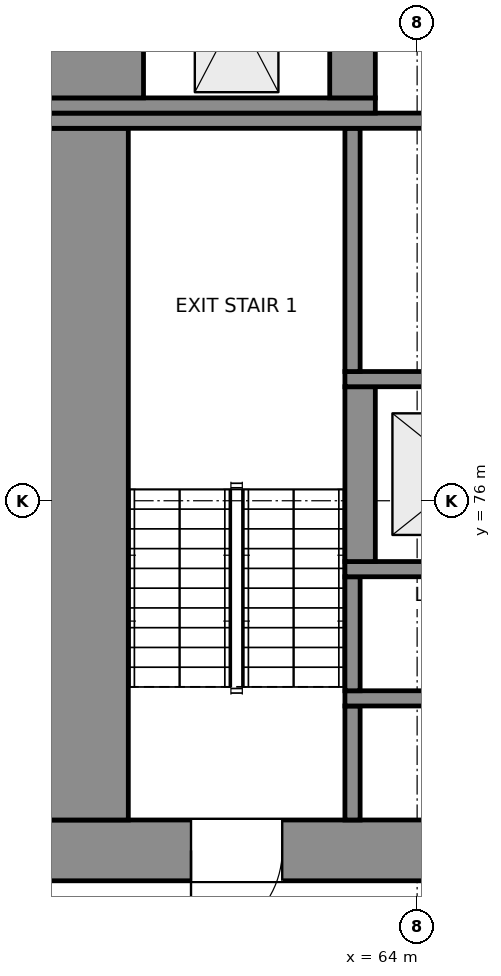
"""IFC4 building model, lengths in metres.
Left out: names, types, materials, properties, quantities, classifications, styles, units other than length and angle.
Written with IfcOpenShell. Run it as: python <this file> out.ifc"""

import sys

from ifc_helpers import new_model, si_unit, direction, frame, frame_2d, origin, place, context, subcontext, project, spatial, rectangle, extrude, element, fill, save


model = new_model("IFC4")
c1 = context("Model", 3, precision=1e-05, world=origin(), true_north=direction((0.0, 1.0)))
c2 = subcontext(c1, "Body", "Model", "MODEL_VIEW")
j1 = project(units=[si_unit("LENGTHUNIT", "METRE"), si_unit("PLANEANGLEUNIT", "RADIAN")], contexts=[c1])
p1 = place(None, origin())
s1 = spatial("IfcSite", under=j1, at=p1, CompositionType="ELEMENT")
p2 = place(p1, origin())
s2 = spatial("IfcBuilding", under=s1, at=p2, CompositionType="ELEMENT")
p3 = place(p2, frame((0.0, 0.0, 204.3)))
s3 = spatial("IfcBuildingStorey", under=s2, at=p3, CompositionType="ELEMENT", Elevation=204.3)
p4 = place(p3, frame((59.0, 71.4, 0.0), z_axis=(0.0, 0.0, 1.0), x_axis=(1.0, 0.0, 0.0)))
e1 = element("IfcWall", 1, at=p4, inside=s3, PredefinedType="SHEAR", context=c2, shape_type="SweptSolid", body=[
    extrude(rectangle(XDim=22.0, YDim=0.8, at=frame_2d((11.0, 0.0))), origin(), (0.0, 0.0, 1.0), 3.9),
])
p5 = place(p4, frame((2.025, 0.0, 0.0)))
e2 = element("IfcOpeningElement", 2, at=p5, cuts=e1, PredefinedType="OPENING", context=c2, shape_type="SweptSolid", body=[
    extrude(rectangle(XDim=1.2, YDim=2.1, at=frame_2d((0.6, 1.05))), frame((0.0, 0.41, 0.0), z_axis=(0.0, -1.0, 0.0), x_axis=(1.0, 0.0, 0.0)), (0.0, 0.0, 1.0), 0.82),
])
p6 = place(p4, frame((18.775, 0.0, 0.0)))
e3 = element("IfcOpeningElement", 3, at=p6, cuts=e1, PredefinedType="OPENING", context=c2, shape_type="SweptSolid", body=[
    extrude(rectangle(XDim=1.2, YDim=2.1, at=frame_2d((0.6, 1.05))), frame((0.0, 0.41, 0.0), z_axis=(0.0, -1.0, 0.0), x_axis=(1.0, 0.0, 0.0)), (0.0, 0.0, 1.0), 0.82),
])
p7 = place(p4, frame((10.0, 0.0, 0.0)))
e4 = element("IfcOpeningElement", 4, at=p7, cuts=e1, PredefinedType="OPENING", context=c2, shape_type="SweptSolid", body=[
    extrude(rectangle(XDim=2.0, YDim=2.1, at=frame_2d((1.0, 1.05))), frame((0.0, 0.41, 0.0), z_axis=(0.0, -1.0, 0.0), x_axis=(1.0, 0.0, 0.0)), (0.0, 0.0, 1.0), 0.82),
])
p8 = place(p3, frame((59.6, 71.8, 0.0), z_axis=(0.0, 0.0, 1.0), x_axis=(0.0, 1.0, 0.0)))
e5 = element("IfcWall", 5, at=p8, inside=s3, PredefinedType="SHEAR", context=c2, shape_type="SweptSolid", body=[
    extrude(rectangle(XDim=9.1, YDim=1.2, at=frame_2d((4.55, 0.0))), origin(), (0.0, 0.0, 1.0), 3.9),
])
p9 = place(p3, frame((63.15, 71.8, 0.0), z_axis=(0.0, 0.0, 1.0), x_axis=(0.0, 1.0, 0.0)))
e6 = element("IfcWall", 6, at=p9, inside=s3, PredefinedType="SHEAR", context=c2, shape_type="SweptSolid", body=[
    extrude(rectangle(XDim=1.5, YDim=0.2, at=frame_2d((0.75, 0.0))), origin(), (0.0, 0.0, 1.0), 3.9),
])
p10 = place(p3, frame((63.05, 73.4, 0.0), z_axis=(0.0, 0.0, 1.0), x_axis=(1.0, 0.0, 0.0)))
e7 = element("IfcWall", 7, at=p10, inside=s3, PredefinedType="SHEAR", context=c2, shape_type="SweptSolid", body=[
    extrude(rectangle(XDim=5.7, YDim=0.2, at=frame_2d((2.85, 0.0))), origin(), (0.0, 0.0, 1.0), 3.9),
])
p11 = place(p3, frame((63.15, 73.5, 0.0), z_axis=(0.0, 0.0, 1.0), x_axis=(0.0, 1.0, 0.0)))
e8 = element("IfcWall", 8, at=p11, inside=s3, PredefinedType="SHEAR", context=c2, shape_type="SweptSolid", body=[
    extrude(rectangle(XDim=1.5, YDim=0.2, at=frame_2d((0.75, 0.0))), origin(), (0.0, 0.0, 1.0), 3.9),
])
p12 = place(p3, frame((63.05, 75.1, 0.0), z_axis=(0.0, 0.0, 1.0), x_axis=(1.0, 0.0, 0.0)))
e9 = element("IfcWall", 9, at=p12, inside=s3, PredefinedType="SHEAR", context=c2, shape_type="SweptSolid", body=[
    extrude(rectangle(XDim=5.7, YDim=0.2, at=frame_2d((2.85, 0.0))), origin(), (0.0, 0.0, 1.0), 3.9),
])
p13 = place(p3, frame((63.25, 75.2, 0.0), z_axis=(0.0, 0.0, 1.0), x_axis=(0.0, 1.0, 0.0)))
e10 = element("IfcWall", 10, at=p13, inside=s3, PredefinedType="SHEAR", context=c2, shape_type="SweptSolid", body=[
    extrude(rectangle(XDim=2.3, YDim=0.4, at=frame_2d((1.15, 0.0))), origin(), (0.0, 0.0, 1.0), 3.9),
])
p14 = place(p3, frame((63.05, 77.6, 0.0), z_axis=(0.0, 0.0, 1.0), x_axis=(1.0, 0.0, 0.0)))
e11 = element("IfcWall", 11, at=p14, inside=s3, PredefinedType="SHEAR", context=c2, shape_type="SweptSolid", body=[
    extrude(rectangle(XDim=5.7, YDim=0.2, at=frame_2d((2.85, 0.0))), origin(), (0.0, 0.0, 1.0), 3.9),
])
p15 = place(p14, frame((1.075, 0.0, 0.0)))
e12 = element("IfcOpeningElement", 12, at=p15, cuts=e11, PredefinedType="OPENING", context=c2, shape_type="SweptSolid", body=[
    extrude(rectangle(XDim=1.1, YDim=2.1, at=frame_2d((0.55, 1.05))), frame((0.0, 0.11, 0.0), z_axis=(0.0, -1.0, 0.0), x_axis=(1.0, 0.0, 0.0)), (0.0, 0.0, 1.0), 0.22),
])
p16 = place(p14, frame((3.725, 0.0, 0.0)))
e13 = element("IfcOpeningElement", 13, at=p16, cuts=e11, PredefinedType="OPENING", context=c2, shape_type="SweptSolid", body=[
    extrude(rectangle(XDim=1.1, YDim=2.1, at=frame_2d((0.55, 1.05))), frame((0.0, 0.11, 0.0), z_axis=(0.0, -1.0, 0.0), x_axis=(1.0, 0.0, 0.0)), (0.0, 0.0, 1.0), 0.22),
])
p17 = place(p3, frame((63.15, 77.7, 0.0), z_axis=(0.0, 0.0, 1.0), x_axis=(0.0, 1.0, 0.0)))
e14 = element("IfcWall", 14, at=p17, inside=s3, PredefinedType="SHEAR", context=c2, shape_type="SweptSolid", body=[
    extrude(rectangle(XDim=3.2, YDim=0.2, at=frame_2d((1.6, 0.0))), origin(), (0.0, 0.0, 1.0), 3.9),
])
p18 = place(p3, frame((59.0, 81.0, 0.0), z_axis=(0.0, 0.0, 1.0), x_axis=(1.0, 0.0, 0.0)))
e15 = element("IfcWall", 15, at=p18, inside=s3, PredefinedType="SHEAR", context=c2, shape_type="SweptSolid", body=[
    extrude(rectangle(XDim=22.0, YDim=0.2, at=frame_2d((11.0, 0.0))), origin(), (0.0, 0.0, 1.0), 3.9),
])
p19 = place(p18, frame((11.85, 0.0, 0.0)))
e16 = element("IfcOpeningElement", 16, at=p19, cuts=e15, PredefinedType="OPENING", context=c2, shape_type="SweptSolid", body=[
    extrude(rectangle(XDim=0.9, YDim=2.1, at=frame_2d((0.45, 1.05))), frame((0.0, 0.11, 0.0), z_axis=(0.0, -1.0, 0.0), x_axis=(1.0, 0.0, 0.0)), (0.0, 0.0, 1.0), 0.22),
])
p20 = place(p3, frame((59.0, 81.2, 0.0), z_axis=(0.0, 0.0, 1.0), x_axis=(1.0, 0.0, 0.0)))
e17 = element("IfcWall", 17, at=p20, inside=s3, PredefinedType="SHEAR", context=c2, shape_type="SweptSolid", body=[
    extrude(rectangle(XDim=4.45, YDim=0.2, at=frame_2d((2.225, 0.0))), origin(), (0.0, 0.0, 1.0), 3.9),
])
p21 = place(p3, frame((59.7, 81.3, 0.0), z_axis=(0.0, 0.0, 1.0), x_axis=(0.0, 1.0, 0.0)))
e18 = element("IfcWall", 18, at=p21, inside=s3, PredefinedType="SHEAR", context=c2, shape_type="SweptSolid", body=[
    extrude(rectangle(XDim=2.25, YDim=1.4, at=frame_2d((1.125, 0.0))), origin(), (0.0, 0.0, 1.0), 3.9),
])
p22 = place(p3, frame((63.15, 81.3, 0.0), z_axis=(0.0, 0.0, 1.0), x_axis=(0.0, 1.0, 0.0)))
e19 = element("IfcWall", 19, at=p22, inside=s3, PredefinedType="SHEAR", context=c2, shape_type="SweptSolid", body=[
    extrude(rectangle(XDim=2.25, YDim=0.6, at=frame_2d((1.125, 0.0))), origin(), (0.0, 0.0, 1.0), 3.9),
])
p23 = place(p5, frame((1.2, 0.0, 0.0), z_axis=(0.0, 0.0, 1.0), x_axis=(-1.0, 0.0, 0.0)))
e20 = element("IfcDoor", 20, at=p23, inside=s3, OperationType="SINGLE_SWING_RIGHT", PredefinedType="DOOR", context=c2, shape_type="SweptSolid", body=[
    extrude(rectangle(XDim=1.2, YDim=2.1, at=frame_2d((0.6, 1.05))), frame((0.0, 0.025, 0.0), z_axis=(0.0, -1.0, 0.0), x_axis=(1.0, 0.0, 0.0)), (0.0, 0.0, 1.0), 0.05),
])
fill(e2, e20)
save(model, sys.argv[1])
